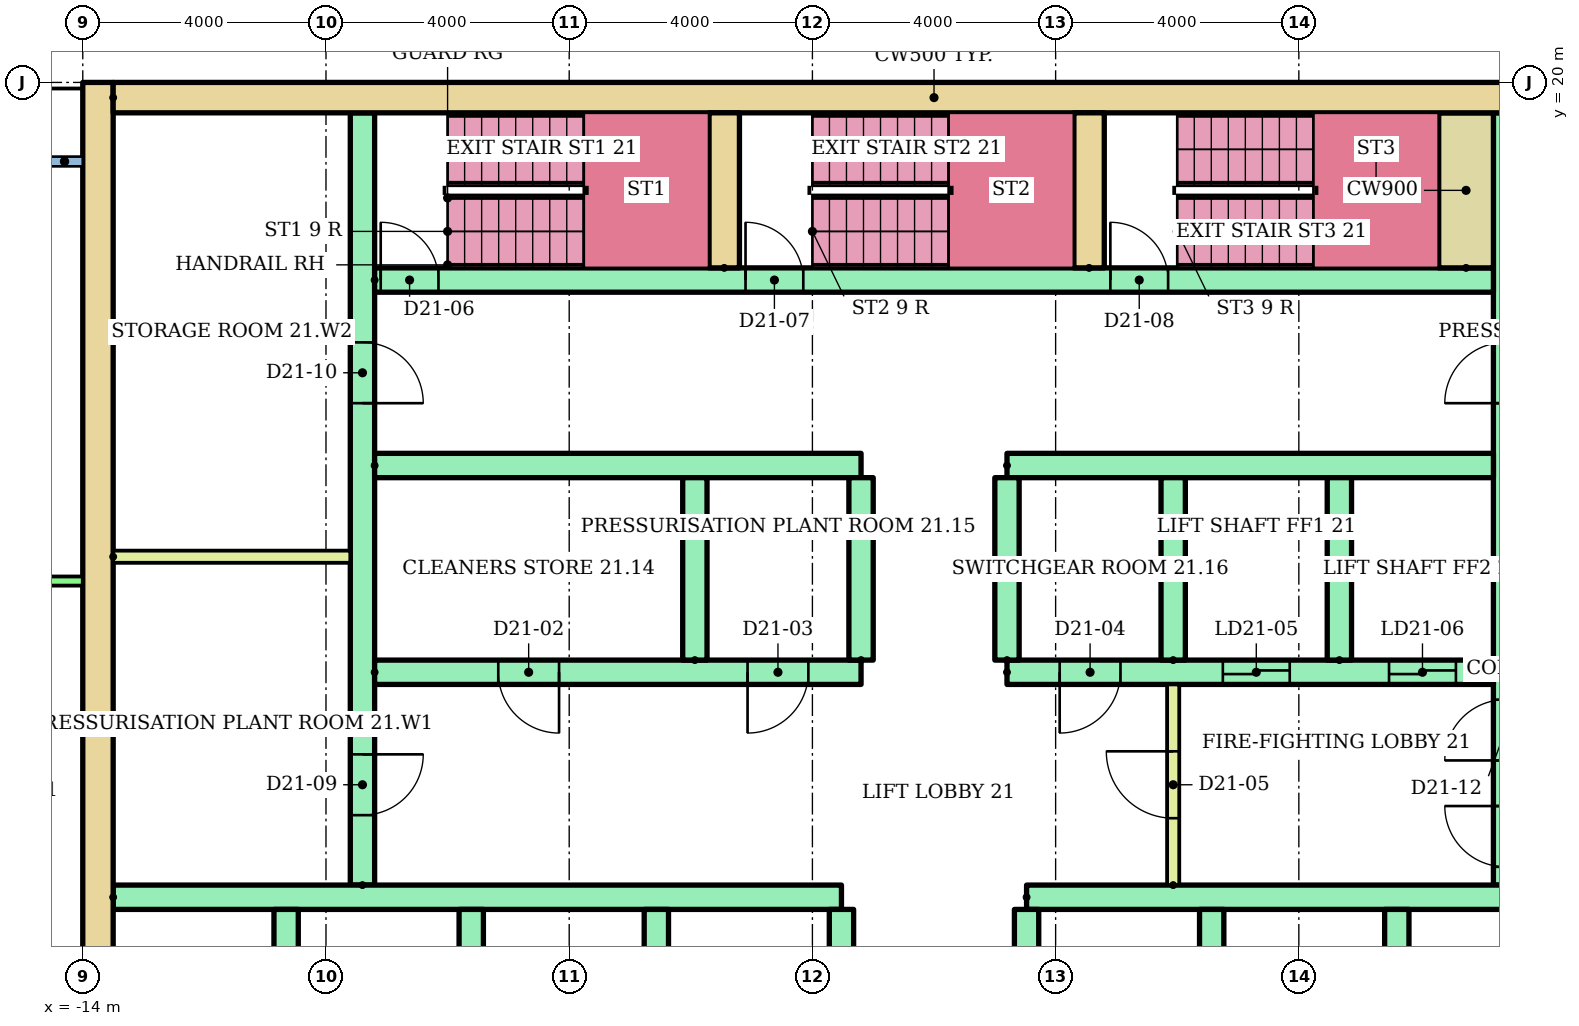
"""IFC4 building model, lengths in metres.
Left out: names, types, materials, properties, quantities, classifications, styles, units other than length and angle.
Written with IfcOpenShell. Run it as: python <this file> out.ifc"""

import sys

from ifc_helpers import new_model, si_unit, direction, frame, frame_2d, origin, place, context, subcontext, project, spatial, rectangle, extrude, element, fill, save


model = new_model("IFC4")
c1 = context("Model", 3, precision=1e-05, world=origin(), true_north=direction((0.0, 1.0)))
c2 = subcontext(c1, "Body", "Model", "MODEL_VIEW")
j1 = project(units=[si_unit("LENGTHUNIT", "METRE"), si_unit("PLANEANGLEUNIT", "RADIAN")], contexts=[c1])
p1 = place(None, origin())
s1 = spatial("IfcSite", under=j1, at=p1, CompositionType="ELEMENT")
p2 = place(p1, origin())
s2 = spatial("IfcBuilding", under=s1, at=p2, CompositionType="ELEMENT")
p3 = place(p2, frame((0.0, 0.0, 83.9)))
s3 = spatial("IfcBuildingStorey", under=s2, at=p3, CompositionType="ELEMENT", Elevation=83.9)
p4 = place(p3, frame((-13.75, 3.0, 0.0), z_axis=(0.0, 0.0, 1.0), x_axis=(0.0, 1.0, 0.0)))
e1 = element("IfcWall", 1, at=p4, inside=s3, PredefinedType="SHEAR", context=c2, shape_type="SweptSolid", body=[
    extrude(rectangle(XDim=17.0, YDim=0.5, at=frame_2d((8.5, 0.0))), origin(), (0.0, 0.0, 1.0), 2.92),
])
p5 = place(p3, frame((-13.5, 19.75, 0.0)))
e2 = element("IfcWall", 2, at=p5, inside=s3, PredefinedType="SHEAR", context=c2, shape_type="SweptSolid", body=[
    extrude(rectangle(XDim=27.0, YDim=0.5, at=frame_2d((13.5, 0.0))), origin(), (0.0, 0.0, 1.0), 2.92),
])
p6 = place(p3, frame((-9.4, 6.8, 0.0), z_axis=(0.0, 0.0, 1.0), x_axis=(0.0, 1.0, 0.0)))
e3 = element("IfcWall", 3, at=p6, inside=s3, PredefinedType="SHEAR", context=c2, shape_type="SweptSolid", body=[
    extrude(rectangle(XDim=12.7, YDim=0.4, at=frame_2d((6.35, 0.0))), origin(), (0.0, 0.0, 1.0), 2.92),
])
p7 = place(p6, frame((1.15, 0.0, 0.0)))
e4 = element("IfcOpeningElement", 4, at=p7, cuts=e3, PredefinedType="OPENING", context=c2, shape_type="SweptSolid", body=[
    extrude(rectangle(XDim=1.0, YDim=2.1, at=frame_2d((0.5, 1.05))), frame((0.0, 0.21, 0.0), z_axis=(0.0, -1.0, 0.0), x_axis=(1.0, 0.0, 0.0)), (0.0, 0.0, 1.0), 0.42),
])
p8 = place(p6, frame((7.925, 0.0, 0.0)))
e5 = element("IfcOpeningElement", 5, at=p8, cuts=e3, PredefinedType="OPENING", context=c2, shape_type="SweptSolid", body=[
    extrude(rectangle(XDim=1.0, YDim=2.1, at=frame_2d((0.5, 1.05))), frame((0.0, 0.21, 0.0), z_axis=(0.0, -1.0, 0.0), x_axis=(1.0, 0.0, 0.0)), (0.0, 0.0, 1.0), 0.42),
])
p9 = place(p3, frame((9.4, 6.8, 0.0), z_axis=(0.0, 0.0, 1.0), x_axis=(0.0, 1.0, 0.0)))
e6 = element("IfcWall", 6, at=p9, inside=s3, PredefinedType="SHEAR", context=c2, shape_type="SweptSolid", body=[
    extrude(rectangle(XDim=12.7, YDim=0.4, at=frame_2d((6.35, 0.0))), origin(), (0.0, 0.0, 1.0), 2.92),
])
p10 = place(p9, frame((0.3, 0.0, 0.0)))
e7 = element("IfcOpeningElement", 7, at=p10, cuts=e6, PredefinedType="OPENING", context=c2, shape_type="SweptSolid", body=[
    extrude(rectangle(XDim=1.0, YDim=2.1, at=frame_2d((0.5, 1.05))), frame((0.0, 0.21, 0.0), z_axis=(0.0, -1.0, 0.0), x_axis=(1.0, 0.0, 0.0)), (0.0, 0.0, 1.0), 0.42),
])
p11 = place(p9, frame((2.05, 0.0, 0.0)))
e8 = element("IfcOpeningElement", 8, at=p11, cuts=e6, PredefinedType="OPENING", context=c2, shape_type="SweptSolid", body=[
    extrude(rectangle(XDim=1.0, YDim=2.1, at=frame_2d((0.5, 1.05))), frame((0.0, 0.21, 0.0), z_axis=(0.0, -1.0, 0.0), x_axis=(1.0, 0.0, 0.0)), (0.0, 0.0, 1.0), 0.42),
])
p12 = place(p9, frame((7.925, 0.0, 0.0)))
e9 = element("IfcOpeningElement", 9, at=p12, cuts=e6, PredefinedType="OPENING", context=c2, shape_type="SweptSolid", body=[
    extrude(rectangle(XDim=1.0, YDim=2.1, at=frame_2d((0.5, 1.05))), frame((0.0, 0.21, 0.0), z_axis=(0.0, -1.0, 0.0), x_axis=(1.0, 0.0, 0.0)), (0.0, 0.0, 1.0), 0.42),
])
p13 = place(p3, frame((-13.5, 6.6, 0.0)))
e10 = element("IfcWall", 10, at=p13, inside=s3, PredefinedType="SHEAR", context=c2, shape_type="SweptSolid", body=[
    extrude(rectangle(XDim=11.978, YDim=0.4, at=frame_2d((5.989, 0.0))), origin(), (0.0, 0.0, 1.0), 2.92),
])
p14 = place(p3, frame((1.522, 6.6, 0.0)))
e11 = element("IfcWall", 11, at=p14, inside=s3, PredefinedType="SHEAR", context=c2, shape_type="SweptSolid", body=[
    extrude(rectangle(XDim=8.078, YDim=0.4, at=frame_2d((4.039, 0.0))), origin(), (0.0, 0.0, 1.0), 2.92),
])
for number, where, z_axis, x_axis in (
    (12, (-10.656, 3.4, 0.0), (0.0, 0.0, 1.0), (0.0, 1.0, 0.0)),
    (13, (-7.611, 3.4, 0.0), (0.0, 0.0, 1.0), (0.0, 1.0, 0.0)),
    (14, (-4.567, 3.4, 0.0), (0.0, 0.0, 1.0), (0.0, 1.0, 0.0)),
    (15, (-1.522, 3.4, 0.0), (0.0, 0.0, 1.0), (0.0, 1.0, 0.0)),
    (16, (1.522, 3.4, 0.0), (0.0, 0.0, 1.0), (0.0, 1.0, 0.0)),
    (17, (4.567, 3.4, 0.0), (0.0, 0.0, 1.0), (0.0, 1.0, 0.0)),
    (18, (7.611, 3.4, 0.0), (0.0, 0.0, 1.0), (0.0, 1.0, 0.0)),
):
    element("IfcWall", number, at=place(p3, frame(where, z_axis=z_axis, x_axis=x_axis)), inside=s3, PredefinedType="SHEAR", context=c2, shape_type="SweptSolid", body=[
        extrude(rectangle(XDim=3.0, YDim=0.4, at=frame_2d((1.5, 0.0))), origin(), (0.0, 0.0, 1.0), 2.92),
    ])
p15 = place(p3, frame((-9.2, 10.3, 0.0)))
e19 = element("IfcWall", 19, at=p15, inside=s3, PredefinedType="SHEAR", context=c2, shape_type="SweptSolid", body=[
    extrude(rectangle(XDim=8.0, YDim=0.4, at=frame_2d((4.0, 0.0))), origin(), (0.0, 0.0, 1.0), 2.92),
])
p16 = place(p15, frame((2.033, 0.0, 0.0)))
e20 = element("IfcOpeningElement", 20, at=p16, cuts=e19, PredefinedType="OPENING", context=c2, shape_type="SweptSolid", body=[
    extrude(rectangle(XDim=1.0, YDim=2.1, at=frame_2d((0.5, 1.05))), frame((0.0, 0.21, 0.0), z_axis=(0.0, -1.0, 0.0), x_axis=(1.0, 0.0, 0.0)), (0.0, 0.0, 1.0), 0.42),
])
p17 = place(p15, frame((6.133, 0.0, 0.0)))
e21 = element("IfcOpeningElement", 21, at=p17, cuts=e19, PredefinedType="OPENING", context=c2, shape_type="SweptSolid", body=[
    extrude(rectangle(XDim=1.0, YDim=2.1, at=frame_2d((0.5, 1.05))), frame((0.0, 0.21, 0.0), z_axis=(0.0, -1.0, 0.0), x_axis=(1.0, 0.0, 0.0)), (0.0, 0.0, 1.0), 0.42),
])
p18 = place(p3, frame((-9.2, 13.7, 0.0)))
e22 = element("IfcWall", 22, at=p18, inside=s3, PredefinedType="SHEAR", context=c2, shape_type="SweptSolid", body=[
    extrude(rectangle(XDim=8.0, YDim=0.4, at=frame_2d((4.0, 0.0))), origin(), (0.0, 0.0, 1.0), 2.92),
])
p19 = place(p3, frame((1.2, 10.3, 0.0)))
e23 = element("IfcWall", 23, at=p19, inside=s3, PredefinedType="SHEAR", context=c2, shape_type="SweptSolid", body=[
    extrude(rectangle(XDim=8.0, YDim=0.4, at=frame_2d((4.0, 0.0))), origin(), (0.0, 0.0, 1.0), 2.92),
])
p20 = place(p19, frame((3.55, 0.0, 0.0)))
e24 = element("IfcOpeningElement", 24, at=p20, cuts=e23, PredefinedType="OPENING", context=c2, shape_type="SweptSolid", body=[
    extrude(rectangle(XDim=1.1, YDim=2.1, at=frame_2d((0.55, 1.05))), frame((0.0, 0.21, 0.0), z_axis=(0.0, -1.0, 0.0), x_axis=(1.0, 0.0, 0.0)), (0.0, 0.0, 1.0), 0.42),
])
p21 = place(p19, frame((6.283, 0.0, 0.0)))
e25 = element("IfcOpeningElement", 25, at=p21, cuts=e23, PredefinedType="OPENING", context=c2, shape_type="SweptSolid", body=[
    extrude(rectangle(XDim=1.1, YDim=2.1, at=frame_2d((0.55, 1.05))), frame((0.0, 0.21, 0.0), z_axis=(0.0, -1.0, 0.0), x_axis=(1.0, 0.0, 0.0)), (0.0, 0.0, 1.0), 0.42),
])
p22 = place(p19, frame((0.867, 0.0, 0.0)))
e26 = element("IfcOpeningElement", 26, at=p22, cuts=e23, PredefinedType="OPENING", context=c2, shape_type="SweptSolid", body=[
    extrude(rectangle(XDim=1.0, YDim=2.1, at=frame_2d((0.5, 1.05))), frame((0.0, 0.21, 0.0), z_axis=(0.0, -1.0, 0.0), x_axis=(1.0, 0.0, 0.0)), (0.0, 0.0, 1.0), 0.42),
])
p23 = place(p3, frame((1.2, 13.7, 0.0)))
e27 = element("IfcWall", 27, at=p23, inside=s3, PredefinedType="SHEAR", context=c2, shape_type="SweptSolid", body=[
    extrude(rectangle(XDim=8.0, YDim=0.4, at=frame_2d((4.0, 0.0))), origin(), (0.0, 0.0, 1.0), 2.92),
])
for number, where, z_axis, x_axis in (
    (28, (-3.933, 10.5, 0.0), (0.0, 0.0, 1.0), (0.0, 1.0, 0.0)),
    (29, (-1.2, 10.5, 0.0), (0.0, 0.0, 1.0), (0.0, 1.0, 0.0)),
    (30, (1.2, 10.5, 0.0), (0.0, 0.0, 1.0), (0.0, 1.0, 0.0)),
    (31, (3.933, 10.5, 0.0), (0.0, 0.0, 1.0), (0.0, 1.0, 0.0)),
    (32, (6.667, 10.5, 0.0), (0.0, 0.0, 1.0), (0.0, 1.0, 0.0)),
):
    element("IfcWall", number, at=place(p3, frame(where, z_axis=z_axis, x_axis=x_axis)), inside=s3, PredefinedType="SHEAR", context=c2, shape_type="SweptSolid", body=[
        extrude(rectangle(XDim=3.0, YDim=0.4, at=frame_2d((1.5, 0.0))), origin(), (0.0, 0.0, 1.0), 2.92),
    ])
p24 = place(p3, frame((3.933, 6.8, 0.0), z_axis=(0.0, 0.0, 1.0), x_axis=(0.0, 1.0, 0.0)))
e33 = element("IfcWall", 33, at=p24, inside=s3, PredefinedType="PARTITIONING", context=c2, shape_type="SweptSolid", body=[
    extrude(rectangle(XDim=3.3, YDim=0.2, at=frame_2d((1.65, 0.0))), origin(), (0.0, 0.0, 1.0), 2.92),
])
p25 = place(p24, frame((1.1, 0.0, 0.0)))
e34 = element("IfcOpeningElement", 34, at=p25, cuts=e33, PredefinedType="OPENING", context=c2, shape_type="SweptSolid", body=[
    extrude(rectangle(XDim=1.1, YDim=2.1, at=frame_2d((0.55, 1.05))), frame((0.0, 0.11, 0.0), z_axis=(0.0, -1.0, 0.0), x_axis=(1.0, 0.0, 0.0)), (0.0, 0.0, 1.0), 0.22),
])
p26 = place(p3, frame((-9.2, 16.75, 0.0)))
e35 = element("IfcWall", 35, at=p26, inside=s3, PredefinedType="SHEAR", context=c2, shape_type="SweptSolid", body=[
    extrude(rectangle(XDim=18.4, YDim=0.4, at=frame_2d((9.2, 0.0))), origin(), (0.0, 0.0, 1.0), 2.92),
])
p27 = place(p26, frame((0.1, 0.0, 0.0)))
e36 = element("IfcOpeningElement", 36, at=p27, cuts=e35, PredefinedType="OPENING", context=c2, shape_type="SweptSolid", body=[
    extrude(rectangle(XDim=0.95, YDim=2.1, at=frame_2d((0.475, 1.05))), frame((0.0, 0.21, 0.0), z_axis=(0.0, -1.0, 0.0), x_axis=(1.0, 0.0, 0.0)), (0.0, 0.0, 1.0), 0.42),
])
p28 = place(p26, frame((6.1, 0.0, 0.0)))
e37 = element("IfcOpeningElement", 37, at=p28, cuts=e35, PredefinedType="OPENING", context=c2, shape_type="SweptSolid", body=[
    extrude(rectangle(XDim=0.95, YDim=2.1, at=frame_2d((0.475, 1.05))), frame((0.0, 0.21, 0.0), z_axis=(0.0, -1.0, 0.0), x_axis=(1.0, 0.0, 0.0)), (0.0, 0.0, 1.0), 0.42),
])
p29 = place(p26, frame((12.1, 0.0, 0.0)))
e38 = element("IfcOpeningElement", 38, at=p29, cuts=e35, PredefinedType="OPENING", context=c2, shape_type="SweptSolid", body=[
    extrude(rectangle(XDim=0.95, YDim=2.1, at=frame_2d((0.475, 1.05))), frame((0.0, 0.21, 0.0), z_axis=(0.0, -1.0, 0.0), x_axis=(1.0, 0.0, 0.0)), (0.0, 0.0, 1.0), 0.42),
])
for number, where, z_axis, x_axis in (
    (39, (-3.45, 16.95, 0.0), (0.0, 0.0, 1.0), (0.0, 1.0, 0.0)),
    (40, (2.55, 16.95, 0.0), (0.0, 0.0, 1.0), (0.0, 1.0, 0.0)),
):
    element("IfcWall", number, at=place(p3, frame(where, z_axis=z_axis, x_axis=x_axis)), inside=s3, PredefinedType="SHEAR", context=c2, shape_type="SweptSolid", body=[
        extrude(rectangle(XDim=2.55, YDim=0.5, at=frame_2d((1.275, 0.0))), origin(), (0.0, 0.0, 1.0), 2.92),
    ])
p30 = place(p3, frame((8.75, 16.95, 0.0), z_axis=(0.0, 0.0, 1.0), x_axis=(0.0, 1.0, 0.0)))
e41 = element("IfcWall", 41, at=p30, inside=s3, PredefinedType="SHEAR", context=c2, shape_type="SweptSolid", body=[
    extrude(rectangle(XDim=2.55, YDim=0.9, at=frame_2d((1.275, 0.0))), origin(), (0.0, 0.0, 1.0), 2.92),
])
p31 = place(p3, frame((-13.5, 12.2, 0.0)))
e42 = element("IfcWall", 42, at=p31, inside=s3, PredefinedType="PARTITIONING", context=c2, shape_type="SweptSolid", body=[
    extrude(rectangle(XDim=3.9, YDim=0.2, at=frame_2d((1.95, 0.0))), origin(), (0.0, 0.0, 1.0), 2.92),
])
p32 = place(p3, frame((-28.62, 11.8, 0.0)))
e43 = element("IfcWall", 43, at=p32, inside=s3, PredefinedType="PARTITIONING", context=c2, shape_type="SweptSolid", body=[
    extrude(rectangle(XDim=14.62, YDim=0.15, at=frame_2d((7.31, 0.0))), origin(), (0.0, 0.0, 1.0), 2.4),
])
p33 = place(p32, frame((1.97, 0.0, 0.0)))
e44 = element("IfcOpeningElement", 44, at=p33, cuts=e43, PredefinedType="OPENING", context=c2, shape_type="SweptSolid", body=[
    extrude(rectangle(XDim=1.0, YDim=2.1, at=frame_2d((0.5, 1.05))), frame((0.0, 0.085, 0.0), z_axis=(0.0, -1.0, 0.0), x_axis=(1.0, 0.0, 0.0)), (0.0, 0.0, 1.0), 0.17),
])
p34 = place(p32, frame((9.22, 0.0, 0.0)))
e45 = element("IfcOpeningElement", 45, at=p34, cuts=e43, PredefinedType="OPENING", context=c2, shape_type="SweptSolid", body=[
    extrude(rectangle(XDim=0.9, YDim=2.1, at=frame_2d((0.45, 1.05))), frame((0.0, 0.085, 0.0), z_axis=(0.0, -1.0, 0.0), x_axis=(1.0, 0.0, 0.0)), (0.0, 0.0, 1.0), 0.17),
])
p35 = place(p20, origin())
e46 = element("IfcDoor", 46, at=p35, inside=s3, OperationType="SLIDING_TO_LEFT", PredefinedType="DOOR", context=c2, shape_type="SweptSolid", body=[
    extrude(rectangle(XDim=1.1, YDim=2.1, at=frame_2d((0.55, 1.05))), frame((0.0, 0.025, 0.0), z_axis=(0.0, -1.0, 0.0), x_axis=(1.0, 0.0, 0.0)), (0.0, 0.0, 1.0), 0.05),
])
fill(e24, e46)
p36 = place(p21, origin())
e47 = element("IfcDoor", 47, at=p36, inside=s3, OperationType="SLIDING_TO_LEFT", PredefinedType="DOOR", context=c2, shape_type="SweptSolid", body=[
    extrude(rectangle(XDim=1.1, YDim=2.1, at=frame_2d((0.55, 1.05))), frame((0.0, 0.025, 0.0), z_axis=(0.0, -1.0, 0.0), x_axis=(1.0, 0.0, 0.0)), (0.0, 0.0, 1.0), 0.05),
])
fill(e25, e47)
p37 = place(p16, frame((1.0, 0.0, 0.0), z_axis=(0.0, 0.0, 1.0), x_axis=(-1.0, 0.0, 0.0)))
e48 = element("IfcDoor", 48, at=p37, inside=s3, OperationType="SINGLE_SWING_RIGHT", PredefinedType="DOOR", context=c2, shape_type="SweptSolid", body=[
    extrude(rectangle(XDim=1.0, YDim=2.1, at=frame_2d((0.5, 1.05))), frame((0.0, 0.025, 0.0), z_axis=(0.0, -1.0, 0.0), x_axis=(1.0, 0.0, 0.0)), (0.0, 0.0, 1.0), 0.05),
])
fill(e20, e48)
p38 = place(p17, frame((1.0, 0.0, 0.0), z_axis=(0.0, 0.0, 1.0), x_axis=(-1.0, 0.0, 0.0)))
e49 = element("IfcDoor", 49, at=p38, inside=s3, OperationType="SINGLE_SWING_LEFT", PredefinedType="DOOR", context=c2, shape_type="SweptSolid", body=[
    extrude(rectangle(XDim=1.0, YDim=2.1, at=frame_2d((0.5, 1.05))), frame((0.0, 0.025, 0.0), z_axis=(0.0, -1.0, 0.0), x_axis=(1.0, 0.0, 0.0)), (0.0, 0.0, 1.0), 0.05),
])
fill(e21, e49)
p39 = place(p22, frame((1.0, 0.0, 0.0), z_axis=(0.0, 0.0, 1.0), x_axis=(-1.0, 0.0, 0.0)))
e50 = element("IfcDoor", 50, at=p39, inside=s3, OperationType="SINGLE_SWING_LEFT", PredefinedType="DOOR", context=c2, shape_type="SweptSolid", body=[
    extrude(rectangle(XDim=1.0, YDim=2.1, at=frame_2d((0.5, 1.05))), frame((0.0, 0.025, 0.0), z_axis=(0.0, -1.0, 0.0), x_axis=(1.0, 0.0, 0.0)), (0.0, 0.0, 1.0), 0.05),
])
fill(e26, e50)
p40 = place(p25, origin())
e51 = element("IfcDoor", 51, at=p40, inside=s3, OperationType="SINGLE_SWING_RIGHT", PredefinedType="DOOR", context=c2, shape_type="SweptSolid", body=[
    extrude(rectangle(XDim=1.1, YDim=2.1, at=frame_2d((0.55, 1.05))), frame((0.0, 0.025, 0.0), z_axis=(0.0, -1.0, 0.0), x_axis=(1.0, 0.0, 0.0)), (0.0, 0.0, 1.0), 0.05),
])
fill(e34, e51)
p41 = place(p27, origin())
e52 = element("IfcDoor", 52, at=p41, inside=s3, OperationType="SINGLE_SWING_LEFT", PredefinedType="DOOR", context=c2, shape_type="SweptSolid", body=[
    extrude(rectangle(XDim=0.95, YDim=2.1, at=frame_2d((0.475, 1.05))), frame((0.0, 0.025, 0.0), z_axis=(0.0, -1.0, 0.0), x_axis=(1.0, 0.0, 0.0)), (0.0, 0.0, 1.0), 0.05),
])
fill(e36, e52)
p42 = place(p28, origin())
e53 = element("IfcDoor", 53, at=p42, inside=s3, OperationType="SINGLE_SWING_LEFT", PredefinedType="DOOR", context=c2, shape_type="SweptSolid", body=[
    extrude(rectangle(XDim=0.95, YDim=2.1, at=frame_2d((0.475, 1.05))), frame((0.0, 0.025, 0.0), z_axis=(0.0, -1.0, 0.0), x_axis=(1.0, 0.0, 0.0)), (0.0, 0.0, 1.0), 0.05),
])
fill(e37, e53)
p43 = place(p29, origin())
e54 = element("IfcDoor", 54, at=p43, inside=s3, OperationType="SINGLE_SWING_LEFT", PredefinedType="DOOR", context=c2, shape_type="SweptSolid", body=[
    extrude(rectangle(XDim=0.95, YDim=2.1, at=frame_2d((0.475, 1.05))), frame((0.0, 0.025, 0.0), z_axis=(0.0, -1.0, 0.0), x_axis=(1.0, 0.0, 0.0)), (0.0, 0.0, 1.0), 0.05),
])
fill(e38, e54)
p44 = place(p7, frame((1.0, 0.0, 0.0), z_axis=(0.0, 0.0, 1.0), x_axis=(-1.0, 0.0, 0.0)))
e55 = element("IfcDoor", 55, at=p44, inside=s3, OperationType="SINGLE_SWING_RIGHT", PredefinedType="DOOR", context=c2, shape_type="SweptSolid", body=[
    extrude(rectangle(XDim=1.0, YDim=2.1, at=frame_2d((0.5, 1.05))), frame((0.0, 0.025, 0.0), z_axis=(0.0, -1.0, 0.0), x_axis=(1.0, 0.0, 0.0)), (0.0, 0.0, 1.0), 0.05),
])
fill(e4, e55)
p45 = place(p8, frame((1.0, 0.0, 0.0), z_axis=(0.0, 0.0, 1.0), x_axis=(-1.0, 0.0, 0.0)))
e56 = element("IfcDoor", 56, at=p45, inside=s3, OperationType="SINGLE_SWING_LEFT", PredefinedType="DOOR", context=c2, shape_type="SweptSolid", body=[
    extrude(rectangle(XDim=1.0, YDim=2.1, at=frame_2d((0.5, 1.05))), frame((0.0, 0.025, 0.0), z_axis=(0.0, -1.0, 0.0), x_axis=(1.0, 0.0, 0.0)), (0.0, 0.0, 1.0), 0.05),
])
fill(e5, e56)
save(model, sys.argv[1])
